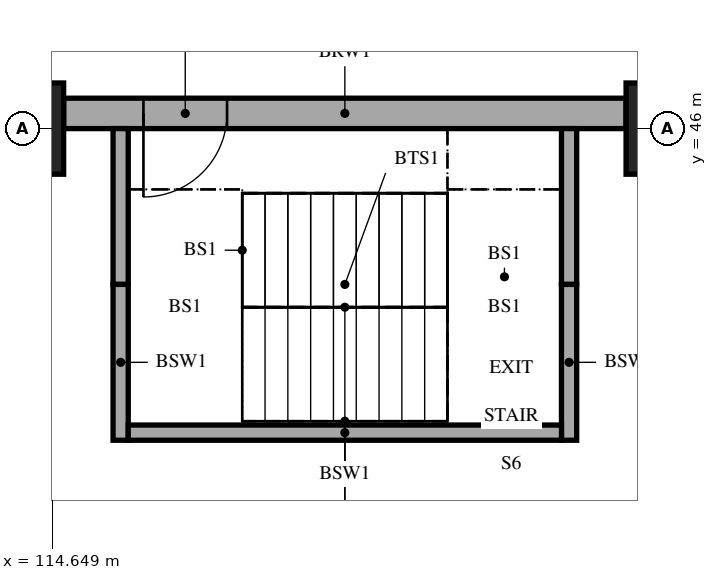
"""IFC4 building model, lengths in metres.
Left out: names, types, materials, properties, quantities, classifications, styles, units other than length and angle.
Written with IfcOpenShell. Run it as: python <this file> out.ifc"""

import sys

from ifc_helpers import new_model, si_unit, direction, frame, frame_2d, origin, origin_2d, place, context, subcontext, project, spatial, rectangle, extrude, element, fill, save


model = new_model("IFC4")
c1 = context("Model", 3, precision=1e-05, world=origin(), true_north=direction((0.0, 1.0)))
c2 = subcontext(c1, "Body", "Model", "MODEL_VIEW")
j1 = project(units=[si_unit("LENGTHUNIT", "METRE"), si_unit("PLANEANGLEUNIT", "RADIAN")], contexts=[c1])
p1 = place(None, origin())
s1 = spatial("IfcSite", under=j1, at=p1, CompositionType="ELEMENT")
p2 = place(p1, origin())
s2 = spatial("IfcBuilding", under=s1, at=p2, CompositionType="ELEMENT")
p3 = place(p2, frame((0.0, 0.0, -8.4)))
s3 = spatial("IfcBuildingStorey", under=s2, at=p3, CompositionType="ELEMENT", Elevation=-8.4)
for number, where, z_axis, x_axis in (
    (1, (114.0, 46.0, 0.0), (0.0, 0.0, 1.0), (1.0, 0.0, 0.0)),
    (2, (123.0, 46.0, 0.0), (0.0, 0.0, 1.0), (1.0, 0.0, 0.0)),
):
    element("IfcColumn", number, at=place(p3, frame(where, z_axis=z_axis, x_axis=x_axis)), inside=s3, PredefinedType="COLUMN", context=c2, shape_type="SweptSolid", body=[
        extrude(rectangle(XDim=1.6, YDim=1.2, at=origin_2d()), origin(), (0.0, 0.0, 1.0), 4.2),
    ])
p4 = place(p3, frame((114.8, 46.2, 0.0), z_axis=(0.0, 0.0, 1.0), x_axis=(1.0, 0.0, 0.0)))
e3 = element("IfcWall", 3, at=p4, inside=s3, PredefinedType="SOLIDWALL", context=c2, shape_type="SweptSolid", body=[
    extrude(rectangle(XDim=7.4, YDim=0.4, at=frame_2d((3.7, 0.0))), origin(), (0.0, 0.0, 1.0), 4.2),
])
p5 = place(p4, frame((1.05, 0.0, 0.0)))
e4 = element("IfcOpeningElement", 4, at=p5, cuts=e3, PredefinedType="OPENING", context=c2, shape_type="SweptSolid", body=[
    extrude(rectangle(XDim=1.1, YDim=2.1, at=frame_2d((0.55, 1.05))), frame((0.0, 0.21, 0.0), z_axis=(0.0, -1.0, 0.0), x_axis=(1.0, 0.0, 0.0)), (0.0, 0.0, 1.0), 0.42),
])
for number, where, z_axis, x_axis in (
    (5, (115.55, 46.0, 0.0), (0.0, 0.0, 1.0), (0.0, -1.0, 0.0)),
    (6, (115.55, 43.95, 0.0), (0.0, 0.0, 1.0), (0.0, -1.0, 0.0)),
    (7, (121.45, 46.0, 0.0), (0.0, 0.0, 1.0), (0.0, -1.0, 0.0)),
    (8, (121.45, 43.95, 0.0), (0.0, 0.0, 1.0), (0.0, -1.0, 0.0)),
):
    element("IfcWall", number, at=place(p3, frame(where, z_axis=z_axis, x_axis=x_axis)), inside=s3, PredefinedType="SOLIDWALL", context=c2, shape_type="SweptSolid", body=[
        extrude(rectangle(XDim=2.05, YDim=0.2, at=frame_2d((1.025, 0.0))), origin(), (0.0, 0.0, 1.0), 4.2),
    ])
p6 = place(p3, frame((115.65, 42.0, 0.0), z_axis=(0.0, 0.0, 1.0), x_axis=(1.0, 0.0, 0.0)))
e9 = element("IfcWall", 9, at=p6, inside=s3, PredefinedType="SOLIDWALL", context=c2, shape_type="SweptSolid", body=[
    extrude(rectangle(XDim=5.7, YDim=0.2, at=frame_2d((2.85, 0.0))), origin(), (0.0, 0.0, 1.0), 4.2),
])
p7 = place(p5, frame((1.1, 0.0, 0.0), z_axis=(0.0, 0.0, 1.0), x_axis=(-1.0, 0.0, 0.0)))
e10 = element("IfcDoor", 10, at=p7, inside=s3, OperationType="SINGLE_SWING_RIGHT", PredefinedType="DOOR", context=c2, shape_type="SweptSolid", body=[
    extrude(rectangle(XDim=1.1, YDim=2.1, at=frame_2d((0.55, 1.05))), frame((0.0, 0.025, 0.0), z_axis=(0.0, -1.0, 0.0), x_axis=(1.0, 0.0, 0.0)), (0.0, 0.0, 1.0), 0.05),
])
fill(e4, e10)
save(model, sys.argv[1])
